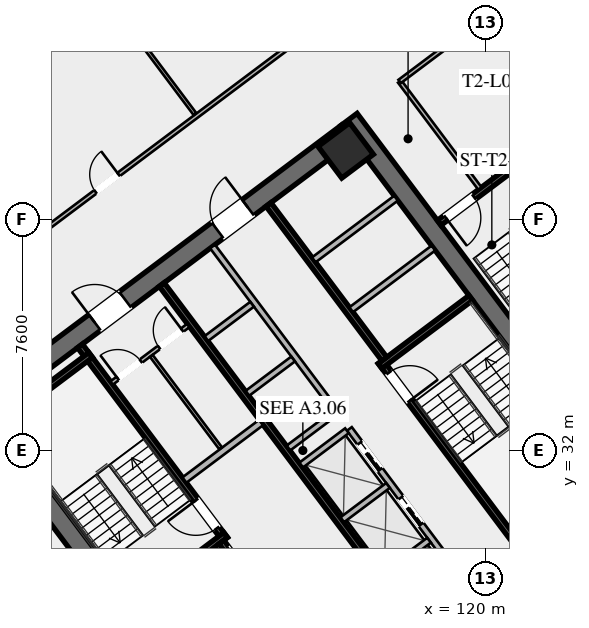
"""IFC4 building model, lengths in metres.
Left out: names, types, materials, properties, quantities, classifications, styles, units other than length and angle.
Written with IfcOpenShell. Run it as: python <this file> out.ifc"""

import sys

from ifc_helpers import new_model, si_unit, direction, frame, frame_2d, origin, origin_2d, place, context, subcontext, project, spatial, rectangle, hollow_rectangle, extrude, element, fill, save


model = new_model("IFC4")
c1 = context("Model", 3, precision=1e-05, world=origin(), true_north=direction((0.0, 1.0)))
c2 = subcontext(c1, "Body", "Model", "MODEL_VIEW")
j1 = project(units=[si_unit("LENGTHUNIT", "METRE"), si_unit("PLANEANGLEUNIT", "RADIAN")], contexts=[c1])
p1 = place(None, origin())
s1 = spatial("IfcSite", under=j1, at=p1, CompositionType="ELEMENT")
p2 = place(p1, origin())
s2 = spatial("IfcBuilding", under=s1, at=p2, CompositionType="ELEMENT")
p3 = place(p2, frame((0.0, 0.0, 24.6)))
s3 = spatial("IfcBuildingStorey", under=s2, at=p3, CompositionType="ELEMENT", Elevation=24.6)
for number, where, z_axis, x_axis in (
    (1, (112.476, 21.107, 0.0), (0.0, 0.0, 1.0), (-0.6, 0.8, 0.0)),
    (2, (115.524, 42.893, 0.0), (0.0, 0.0, 1.0), (0.6, -0.8, 0.0)),
):
    element("IfcWall", number, at=place(p3, frame(where, z_axis=z_axis, x_axis=x_axis)), inside=s3, PredefinedType="SHEAR", context=c2, shape_type="SweptSolid", body=[
        extrude(rectangle(XDim=15.6, YDim=0.65, at=frame_2d((7.8, 0.0))), origin(), (0.0, 0.0, 1.0), 3.55),
    ])
p4 = place(p3, frame((124.429, 30.478, 0.0), z_axis=(0.0, 0.0, 1.0), x_axis=(-0.799998028465, -0.600002628705, 0.0)))
e3 = element("IfcWall", 3, at=p4, inside=s3, PredefinedType="SHEAR", context=c2, shape_type="SweptSolid", body=[
    extrude(rectangle(XDim=14.86, YDim=0.65, at=frame_2d((7.43, 0.0))), origin(), (0.0, 0.0, 1.0), 3.55),
])
p5 = place(p4, frame((9.13, 0.0, 0.0)))
e4 = element("IfcOpeningElement", 4, at=p5, cuts=e3, PredefinedType="OPENING", context=c2, shape_type="SweptSolid", body=[
    extrude(rectangle(XDim=1.25, YDim=2.25, at=frame_2d((0.625, 1.125))), frame((0.0, 0.335, 0.0), z_axis=(0.0, -1.0, 0.0), x_axis=(1.0, 0.0, 0.0)), (0.0, 0.0, 1.0), 0.67),
])
p6 = place(p4, frame((4.08, 0.0, 0.0)))
e5 = element("IfcOpeningElement", 5, at=p6, cuts=e3, PredefinedType="OPENING", context=c2, shape_type="SweptSolid", body=[
    extrude(rectangle(XDim=1.25, YDim=2.25, at=frame_2d((0.625, 1.125))), frame((0.0, 0.335, 0.0), z_axis=(0.0, -1.0, 0.0), x_axis=(1.0, 0.0, 0.0)), (0.0, 0.0, 1.0), 0.67),
])
p7 = place(p3, frame((103.571, 33.522, 0.0), z_axis=(0.0, 0.0, 1.0), x_axis=(0.799998028465, 0.600002628705, 0.0)))
e6 = element("IfcWall", 6, at=p7, inside=s3, PredefinedType="SHEAR", context=c2, shape_type="SweptSolid", body=[
    extrude(rectangle(XDim=14.86, YDim=0.65, at=frame_2d((7.43, 0.0))), origin(), (0.0, 0.0, 1.0), 3.55),
])
p8 = place(p7, frame((4.48, 0.0, 0.0)))
e7 = element("IfcOpeningElement", 7, at=p8, cuts=e6, PredefinedType="OPENING", context=c2, shape_type="SweptSolid", body=[
    extrude(rectangle(XDim=1.25, YDim=2.25, at=frame_2d((0.625, 1.125))), frame((0.0, 0.335, 0.0), z_axis=(0.0, -1.0, 0.0), x_axis=(1.0, 0.0, 0.0)), (0.0, 0.0, 1.0), 0.67),
])
p9 = place(p7, frame((9.53, 0.0, 0.0)))
e8 = element("IfcOpeningElement", 8, at=p9, cuts=e6, PredefinedType="OPENING", context=c2, shape_type="SweptSolid", body=[
    extrude(rectangle(XDim=1.25, YDim=2.25, at=frame_2d((0.625, 1.125))), frame((0.0, 0.335, 0.0), z_axis=(0.0, -1.0, 0.0), x_axis=(1.0, 0.0, 0.0)), (0.0, 0.0, 1.0), 0.67),
])
p10 = place(p3, frame((115.41, 41.87, 0.0), z_axis=(0.0, 0.0, 1.0), x_axis=(0.799999996291, 0.600000004945, 0.0)))
e9 = element("IfcColumn", 9, at=p10, inside=s3, PredefinedType="COLUMN", context=c2, shape_type="SweptSolid", body=[
    extrude(hollow_rectangle(XDim=1.3, YDim=1.3, WallThickness=0.05, at=origin_2d()), origin(), (0.0, 0.0, 1.0), 3.35),
])
p11 = place(p3, frame((111.44, 29.08, 0.0), z_axis=(0.0, 0.0, 1.0), x_axis=(-0.600009827119, 0.799992629566, 0.0)))
e10 = element("IfcWall", 10, at=p11, inside=s3, PredefinedType="SHEAR", context=c2, shape_type="SweptSolid", body=[
    extrude(rectangle(XDim=7.95, YDim=0.2, at=frame_2d((3.975, 0.0))), origin(), (0.0, 0.0, 1.0), 3.35),
])
p12 = place(p11, frame((0.45, 0.0, 0.0)))
e11 = element("IfcOpeningElement", 11, at=p12, cuts=e10, PredefinedType="OPENING", context=c2, shape_type="SweptSolid", body=[
    extrude(rectangle(XDim=1.15, YDim=2.2, at=frame_2d((0.575, 1.1))), frame((0.0, 0.11, 0.0), z_axis=(0.0, -1.0, 0.0), x_axis=(1.0, 0.0, 0.0)), (0.0, 0.0, 1.0), 0.22),
])
for number, where, z_axis, x_axis in (
    (12, (108.476, 26.982, 0.0), (0.0, 0.0, 1.0), (0.8, 0.6, 0.0)),
    (13, (104.036, 32.902, 0.0), (0.0, 0.0, 1.0), (0.8, 0.6, 0.0)),
):
    element("IfcWall", number, at=place(p3, frame(where, z_axis=z_axis, x_axis=x_axis)), inside=s3, PredefinedType="SHEAR", context=c2, shape_type="SweptSolid", body=[
        extrude(rectangle(XDim=3.73, YDim=0.2, at=frame_2d((1.865, 0.0))), origin(), (0.0, 0.0, 1.0), 3.35),
    ])
p13 = place(p3, frame((116.56, 34.92, 0.0), z_axis=(0.0, 0.0, 1.0), x_axis=(0.600009827119, -0.799992629566, 0.0)))
e14 = element("IfcWall", 14, at=p13, inside=s3, PredefinedType="SHEAR", context=c2, shape_type="SweptSolid", body=[
    extrude(rectangle(XDim=7.95, YDim=0.2, at=frame_2d((3.975, 0.0))), origin(), (0.0, 0.0, 1.0), 3.35),
])
p14 = place(p13, frame((0.45, 0.0, 0.0)))
e15 = element("IfcOpeningElement", 15, at=p14, cuts=e14, PredefinedType="OPENING", context=c2, shape_type="SweptSolid", body=[
    extrude(rectangle(XDim=1.15, YDim=2.2, at=frame_2d((0.575, 1.1))), frame((0.0, 0.11, 0.0), z_axis=(0.0, -1.0, 0.0), x_axis=(1.0, 0.0, 0.0)), (0.0, 0.0, 1.0), 0.22),
])
p15 = place(p3, frame((116.54, 34.78, 0.0), z_axis=(0.0, 0.0, 1.0), x_axis=(0.799984290658, 0.600020945218, 0.0)))
e16 = element("IfcWall", 16, at=p15, inside=s3, PredefinedType="SHEAR", context=c2, shape_type="SweptSolid", body=[
    extrude(rectangle(XDim=3.73, YDim=0.2, at=frame_2d((1.865, 0.0))), origin(), (0.0, 0.0, 1.0), 3.35),
])
p16 = place(p3, frame((117.938, 26.016, 0.0), z_axis=(0.0, 0.0, 1.0), x_axis=(-0.600005463273, 0.799995902516, 0.0)))
e17 = element("IfcWall", 17, at=p16, inside=s3, PredefinedType="SHEAR", context=c2, shape_type="SweptSolid", body=[
    extrude(rectangle(XDim=14.3, YDim=0.2, at=frame_2d((7.15, 0.0))), origin(), (0.0, 0.0, 1.0), 3.35),
])
p17 = place(p3, frame((110.104, 31.028, 0.0), z_axis=(0.0, 0.0, 1.0), x_axis=(0.800018601094, 0.59997519774, 0.0)))
e18 = element("IfcWall", 18, at=p17, inside=s3, PredefinedType="SOLIDWALL", context=c2, shape_type="SweptSolid", body=[
    extrude(rectangle(XDim=3.15, YDim=0.22, at=frame_2d((1.575, 0.0))), origin(), (0.0, 0.0, 1.0), 2.703),
])
p18 = place(p3, frame((115.13, 23.91, 0.0), z_axis=(0.0, 0.0, 1.0), x_axis=(-0.599975393228, 0.800018454488, 0.0)))
e19 = element("IfcWall", 19, at=p18, inside=s3, PredefinedType="SHEAR", context=c2, shape_type="SweptSolid", body=[
    extrude(rectangle(XDim=6.35, YDim=0.2, at=frame_2d((3.175, 0.0))), origin(), (0.0, 0.0, 1.0), 3.35),
])
p19 = place(p18, frame((4.775, 0.0, 0.0)))
e20 = element("IfcOpeningElement", 20, at=p19, cuts=e19, PredefinedType="OPENING", context=c2, shape_type="SweptSolid", body=[
    extrude(rectangle(XDim=1.3, YDim=2.25, at=frame_2d((0.65, 1.125))), frame((0.0, 0.11, 0.0), z_axis=(0.0, -1.0, 0.0), x_axis=(1.0, 0.0, 0.0)), (0.0, 0.0, 1.0), 0.22),
])
p20 = place(p18, frame((2.775, 0.0, 0.0)))
e21 = element("IfcOpeningElement", 21, at=p20, cuts=e19, PredefinedType="OPENING", context=c2, shape_type="SweptSolid", body=[
    extrude(rectangle(XDim=1.3, YDim=2.25, at=frame_2d((0.65, 1.125))), frame((0.0, 0.11, 0.0), z_axis=(0.0, -1.0, 0.0), x_axis=(1.0, 0.0, 0.0)), (0.0, 0.0, 1.0), 0.22),
])
p21 = place(p18, frame((0.575, 0.0, 0.0)))
e22 = element("IfcOpeningElement", 22, at=p21, cuts=e19, PredefinedType="OPENING", context=c2, shape_type="SweptSolid", body=[
    extrude(rectangle(XDim=1.3, YDim=2.25, at=frame_2d((0.65, 1.125))), frame((0.0, 0.11, 0.0), z_axis=(0.0, -1.0, 0.0), x_axis=(1.0, 0.0, 0.0)), (0.0, 0.0, 1.0), 0.22),
])
p22 = place(p3, frame((112.87, 40.09, 0.0), z_axis=(0.0, 0.0, 1.0), x_axis=(0.599975393228, -0.800018454488, 0.0)))
e23 = element("IfcWall", 23, at=p22, inside=s3, PredefinedType="SHEAR", context=c2, shape_type="SweptSolid", body=[
    extrude(rectangle(XDim=6.35, YDim=0.2, at=frame_2d((3.175, 0.0))), origin(), (0.0, 0.0, 1.0), 3.35),
])
for number, where, z_axis, x_axis in (
    (24, (115.59, 36.63, 0.0), (0.0, 0.0, 1.0), (0.8, 0.6, 0.0)),
    (25, (114.36, 38.27, 0.0), (0.0, 0.0, 1.0), (0.8, 0.6, 0.0)),
):
    element("IfcWall", number, at=place(p3, frame(where, z_axis=z_axis, x_axis=x_axis)), inside=s3, PredefinedType="SOLIDWALL", context=c2, shape_type="SweptSolid", body=[
        extrude(rectangle(XDim=3.38, YDim=0.2, at=frame_2d((1.69, 0.0))), origin(), (0.0, 0.0, 1.0), 3.35),
    ])
p23 = place(p3, frame((107.71, 34.22, 0.0), z_axis=(0.0, 0.0, 1.0), x_axis=(0.799981399002, 0.60002480053, 0.0)))
e26 = element("IfcWall", 26, at=p23, inside=s3, PredefinedType="PARTITIONING", context=c2, shape_type="SweptSolid", body=[
    extrude(rectangle(XDim=3.15, YDim=0.135, at=frame_2d((1.575, 0.0))), origin(), (0.0, 0.0, 1.0), 2.703),
])
p24 = place(p23, frame((0.25, 0.0, 0.0)))
e27 = element("IfcOpeningElement", 27, at=p24, cuts=e26, PredefinedType="OPENING", context=c2, shape_type="SweptSolid", body=[
    extrude(rectangle(XDim=0.95, YDim=2.05, at=frame_2d((0.475, 1.025))), frame((0.0, 0.077, 0.0), z_axis=(0.0, -1.0, 0.0), x_axis=(1.0, 0.0, 0.0)), (0.0, 0.0, 1.0), 0.155),
])
p25 = place(p23, frame((1.95, 0.0, 0.0)))
e28 = element("IfcOpeningElement", 28, at=p25, cuts=e26, PredefinedType="OPENING", context=c2, shape_type="SweptSolid", body=[
    extrude(rectangle(XDim=0.95, YDim=2.05, at=frame_2d((0.475, 1.025))), frame((0.0, 0.077, 0.0), z_axis=(0.0, -1.0, 0.0), x_axis=(1.0, 0.0, 0.0)), (0.0, 0.0, 1.0), 0.155),
])
p26 = place(p3, frame((111.296, 32.072, 0.0), z_axis=(0.0, 0.0, 1.0), x_axis=(-0.59995887973, 0.800030838552, 0.0)))
e29 = element("IfcWall", 29, at=p26, inside=s3, PredefinedType="PARTITIONING", context=c2, shape_type="SweptSolid", body=[
    extrude(rectangle(XDim=3.8, YDim=0.11, at=frame_2d((1.9, 0.0))), origin(), (0.0, 0.0, 1.0), 2.703),
])
p27 = place(p3, frame((119.61, 27.27, 0.0), z_axis=(0.0, 0.0, 1.0), x_axis=(-0.600011488909, 0.79999138319, 0.0)))
e30 = element("IfcWall", 30, at=p27, inside=s3, PredefinedType="SOLIDWALL", context=c2, shape_type="SweptSolid", body=[
    extrude(rectangle(XDim=6.8, YDim=0.2, at=frame_2d((3.4, 0.0))), origin(), (0.0, 0.0, 1.0), 3.35),
])
p28 = place(p27, frame((0.625, 0.0, 0.0)))
e31 = element("IfcOpeningElement", 31, at=p28, cuts=e30, PredefinedType="OPENING", context=c2, shape_type="SweptSolid", body=[
    extrude(rectangle(XDim=1.1, YDim=2.2, at=frame_2d((0.55, 1.1))), frame((0.0, 0.11, 0.0), z_axis=(0.0, -1.0, 0.0), x_axis=(1.0, 0.0, 0.0)), (0.0, 0.0, 1.0), 0.22),
])
p29 = place(p27, frame((2.875, 0.0, 0.0)))
e32 = element("IfcOpeningElement", 32, at=p29, cuts=e30, PredefinedType="OPENING", context=c2, shape_type="SweptSolid", body=[
    extrude(rectangle(XDim=1.1, YDim=2.2, at=frame_2d((0.55, 1.1))), frame((0.0, 0.11, 0.0), z_axis=(0.0, -1.0, 0.0), x_axis=(1.0, 0.0, 0.0)), (0.0, 0.0, 1.0), 0.22),
])
p30 = place(p27, frame((5.125, 0.0, 0.0)))
e33 = element("IfcOpeningElement", 33, at=p30, cuts=e30, PredefinedType="OPENING", context=c2, shape_type="SweptSolid", body=[
    extrude(rectangle(XDim=1.1, YDim=2.2, at=frame_2d((0.55, 1.1))), frame((0.0, 0.11, 0.0), z_axis=(0.0, -1.0, 0.0), x_axis=(1.0, 0.0, 0.0)), (0.0, 0.0, 1.0), 0.22),
])
p31 = place(p3, frame((116.646, 27.922, 0.0), z_axis=(0.0, 0.0, 1.0), x_axis=(0.8, 0.6, 0.0)))
e34 = element("IfcWall", 34, at=p31, inside=s3, PredefinedType="SOLIDWALL", context=c2, shape_type="SweptSolid", body=[
    extrude(rectangle(XDim=1.88, YDim=0.2, at=frame_2d((0.94, 0.0))), origin(), (0.0, 0.0, 1.0), 3.35),
])
p32 = place(p3, frame((115.296, 29.722, 0.0), z_axis=(0.0, 0.0, 1.0), x_axis=(0.799984418148, 0.600020775241, 0.0)))
e35 = element("IfcWall", 35, at=p32, inside=s3, PredefinedType="SOLIDWALL", context=c2, shape_type="SweptSolid", body=[
    extrude(rectangle(XDim=1.88, YDim=0.2, at=frame_2d((0.94, 0.0))), origin(), (0.0, 0.0, 1.0), 3.35),
])
p33 = place(p3, frame((113.946, 31.522, 0.0), z_axis=(0.0, 0.0, 1.0), x_axis=(0.8, 0.6, 0.0)))
e36 = element("IfcWall", 36, at=p33, inside=s3, PredefinedType="SOLIDWALL", context=c2, shape_type="SweptSolid", body=[
    extrude(rectangle(XDim=1.88, YDim=0.2, at=frame_2d((0.94, 0.0))), origin(), (0.0, 0.0, 1.0), 3.35),
])
p34 = place(p3, frame((115.11, 33.27, 0.0), z_axis=(0.0, 0.0, 1.0), x_axis=(-0.600011488909, 0.79999138319, 0.0)))
e37 = element("IfcWall", 37, at=p34, inside=s3, PredefinedType="SOLIDWALL", context=c2, shape_type="SweptSolid", body=[
    extrude(rectangle(XDim=6.8, YDim=0.2, at=frame_2d((3.4, 0.0))), origin(), (0.0, 0.0, 1.0), 3.35),
])
p35 = place(p3, frame((113.526, 32.082, 0.0), z_axis=(0.0, 0.0, 1.0), x_axis=(0.800046745961, 0.599937666993, 0.0)))
e38 = element("IfcWall", 38, at=p35, inside=s3, PredefinedType="SOLIDWALL", context=c2, shape_type="SweptSolid", body=[
    extrude(rectangle(XDim=1.88, YDim=0.2, at=frame_2d((0.94, 0.0))), origin(), (0.0, 0.0, 1.0), 3.35),
])
p36 = place(p3, frame((112.176, 33.882, 0.0), z_axis=(0.0, 0.0, 1.0), x_axis=(0.8, 0.6, 0.0)))
e39 = element("IfcWall", 39, at=p36, inside=s3, PredefinedType="SOLIDWALL", context=c2, shape_type="SweptSolid", body=[
    extrude(rectangle(XDim=1.88, YDim=0.2, at=frame_2d((0.94, 0.0))), origin(), (0.0, 0.0, 1.0), 3.35),
])
p37 = place(p3, frame((110.826, 35.682, 0.0), z_axis=(0.0, 0.0, 1.0), x_axis=(0.799984418148, 0.600020775241, 0.0)))
e40 = element("IfcWall", 40, at=p37, inside=s3, PredefinedType="SOLIDWALL", context=c2, shape_type="SweptSolid", body=[
    extrude(rectangle(XDim=1.88, YDim=0.2, at=frame_2d((0.94, 0.0))), origin(), (0.0, 0.0, 1.0), 3.35),
])
p38 = place(p3, frame((121.204, 41.528, 0.0), z_axis=(0.0, 0.0, 1.0), x_axis=(-0.800017232136, -0.599977023131, 0.0)))
e41 = element("IfcWall", 41, at=p38, inside=s3, PredefinedType="SHEAR", context=c2, shape_type="SweptSolid", body=[
    extrude(rectangle(XDim=3.4, YDim=0.2, at=frame_2d((1.7, 0.0))), origin(), (0.0, 0.0, 1.0), 3.35),
])
p39 = place(p38, frame((1.975, 0.0, 0.0)))
e42 = element("IfcOpeningElement", 42, at=p39, cuts=e41, PredefinedType="OPENING", context=c2, shape_type="SweptSolid", body=[
    extrude(rectangle(XDim=1.15, YDim=2.2, at=frame_2d((0.575, 1.1))), frame((0.0, 0.11, 0.0), z_axis=(0.0, -1.0, 0.0), x_axis=(1.0, 0.0, 0.0)), (0.0, 0.0, 1.0), 0.22),
])
p40 = place(p3, frame((119.824, 40.618, 0.0), z_axis=(0.0, 0.0, 1.0), x_axis=(-0.599982243973, 0.800013316712, 0.0)))
e43 = element("IfcWall", 43, at=p40, inside=s3, PredefinedType="PARTITIONING", context=c2, shape_type="SweptSolid", body=[
    extrude(rectangle(XDim=4.4, YDim=0.135, at=frame_2d((2.2, 0.0))), origin(), (0.0, 0.0, 1.0), 2.703),
])
p41 = place(p3, frame((98.516, 34.012, 0.0), z_axis=(0.0, 0.0, 1.0), x_axis=(0.799998035726, 0.600002619023, 0.0)))
e44 = element("IfcWall", 44, at=p41, inside=s3, PredefinedType="PARTITIONING", context=c2, shape_type="SweptSolid", body=[
    extrude(rectangle(XDim=29.83, YDim=0.135, at=frame_2d((14.915, 0.0))), origin(), (0.0, 0.0, 1.0), 2.703),
])
p42 = place(p41, frame((0.3, 0.0, 0.0)))
e45 = element("IfcOpeningElement", 45, at=p42, cuts=e44, PredefinedType="OPENING", context=c2, shape_type="SweptSolid", body=[
    extrude(rectangle(XDim=0.95, YDim=2.05, at=frame_2d((0.475, 1.025))), frame((0.0, 0.077, 0.0), z_axis=(0.0, -1.0, 0.0), x_axis=(1.0, 0.0, 0.0)), (0.0, 0.0, 1.0), 0.155),
])
p43 = place(p41, frame((10.829, 0.0, 0.0)))
e46 = element("IfcOpeningElement", 46, at=p43, cuts=e44, PredefinedType="OPENING", context=c2, shape_type="SweptSolid", body=[
    extrude(rectangle(XDim=0.95, YDim=2.05, at=frame_2d((0.475, 1.025))), frame((0.0, 0.077, 0.0), z_axis=(0.0, -1.0, 0.0), x_axis=(1.0, 0.0, 0.0)), (0.0, 0.0, 1.0), 0.155),
])
p44 = place(p41, frame((28.58, 0.0, 0.0)))
e47 = element("IfcOpeningElement", 47, at=p44, cuts=e44, PredefinedType="OPENING", context=c2, shape_type="SweptSolid", body=[
    extrude(rectangle(XDim=0.95, YDim=2.05, at=frame_2d((0.475, 1.025))), frame((0.0, 0.077, 0.0), z_axis=(0.0, -1.0, 0.0), x_axis=(1.0, 0.0, 0.0)), (0.0, 0.0, 1.0), 0.155),
])
p45 = place(p3, frame((110.452, 43.064, 0.0), z_axis=(0.0, 0.0, 1.0), x_axis=(-0.599992698573, 0.800005476018, 0.0)))
e48 = element("IfcWall", 48, at=p45, inside=s3, PredefinedType="PARTITIONING", context=c2, shape_type="SweptSolid", body=[
    extrude(rectangle(XDim=10.7, YDim=0.11, at=frame_2d((5.35, 0.0))), origin(), (0.0, 0.0, 1.0), 2.703),
])
p46 = place(p3, frame((135.46, 34.47, 0.0), z_axis=(0.0, 0.0, 1.0), x_axis=(-0.800000982127, -0.599998690494, 0.0)))
e49 = element("IfcWall", 49, at=p46, inside=s3, PredefinedType="PARTITIONING", context=c2, shape_type="SweptSolid", body=[
    extrude(rectangle(XDim=29.83, YDim=0.135, at=frame_2d((14.915, 0.0))), origin(), (0.0, 0.0, 1.0), 2.703),
])
p47 = place(p46, frame((28.5, 0.0, 0.0)))
e50 = element("IfcOpeningElement", 50, at=p47, cuts=e49, PredefinedType="OPENING", context=c2, shape_type="SweptSolid", body=[
    extrude(rectangle(XDim=0.95, YDim=2.05, at=frame_2d((0.475, 1.025))), frame((0.0, 0.077, 0.0), z_axis=(0.0, -1.0, 0.0), x_axis=(1.0, 0.0, 0.0)), (0.0, 0.0, 1.0), 0.155),
])
p48 = place(p46, frame((18.075, 0.0, 0.0)))
e51 = element("IfcOpeningElement", 51, at=p48, cuts=e49, PredefinedType="OPENING", context=c2, shape_type="SweptSolid", body=[
    extrude(rectangle(XDim=0.95, YDim=2.05, at=frame_2d((0.475, 1.025))), frame((0.0, 0.077, 0.0), z_axis=(0.0, -1.0, 0.0), x_axis=(1.0, 0.0, 0.0)), (0.0, 0.0, 1.0), 0.155),
])
p49 = place(p46, frame((0.38, 0.0, 0.0)))
e52 = element("IfcOpeningElement", 52, at=p49, cuts=e49, PredefinedType="OPENING", context=c2, shape_type="SweptSolid", body=[
    extrude(rectangle(XDim=0.95, YDim=2.05, at=frame_2d((0.475, 1.025))), frame((0.0, 0.077, 0.0), z_axis=(0.0, -1.0, 0.0), x_axis=(1.0, 0.0, 0.0)), (0.0, 0.0, 1.0), 0.155),
])
p50 = place(p3, frame((126.664, 51.248, 0.0), z_axis=(0.0, 0.0, 1.0), x_axis=(-0.799995055373, -0.600006592779, 0.0)))
e53 = element("IfcWall", 53, at=p50, inside=s3, PredefinedType="PARTITIONING", context=c2, shape_type="SweptSolid", body=[
    extrude(rectangle(XDim=11.85, YDim=0.135, at=frame_2d((5.925, 0.0))), origin(), (0.0, 0.0, 1.0), 2.703),
])
p51 = place(p50, frame((5.8, 0.0, 0.0)))
e54 = element("IfcOpeningElement", 54, at=p51, cuts=e53, PredefinedType="OPENING", context=c2, shape_type="SweptSolid", body=[
    extrude(rectangle(XDim=0.95, YDim=2.05, at=frame_2d((0.475, 1.025))), frame((0.0, 0.077, 0.0), z_axis=(0.0, -1.0, 0.0), x_axis=(1.0, 0.0, 0.0)), (0.0, 0.0, 1.0), 0.155),
])
p52 = place(p3, frame((111.548, 16.636, 0.0), z_axis=(0.0, 0.0, 1.0), x_axis=(-0.600003610192, 0.799997292343, 0.0)))
e55 = element("IfcWall", 55, at=p52, inside=s3, PredefinedType="PARTITIONING", context=c2, shape_type="SweptSolid", body=[
    extrude(rectangle(XDim=21.64, YDim=0.135, at=frame_2d((10.82, 0.0))), origin(), (0.0, 0.0, 1.0), 2.703),
])
p53 = place(p52, frame((0.3, 0.0, 0.0)))
e56 = element("IfcOpeningElement", 56, at=p53, cuts=e55, PredefinedType="OPENING", context=c2, shape_type="SweptSolid", body=[
    extrude(rectangle(XDim=0.95, YDim=2.05, at=frame_2d((0.475, 1.025))), frame((0.0, 0.077, 0.0), z_axis=(0.0, -1.0, 0.0), x_axis=(1.0, 0.0, 0.0)), (0.0, 0.0, 1.0), 0.155),
])
p54 = place(p8, origin())
e57 = element("IfcDoor", 57, at=p54, inside=s3, OperationType="SINGLE_SWING_LEFT", PredefinedType="DOOR", context=c2, shape_type="SweptSolid", body=[
    extrude(rectangle(XDim=1.25, YDim=2.25, at=frame_2d((0.625, 1.125))), frame((0.0, 0.025, 0.0), z_axis=(0.0, -1.0, 0.0), x_axis=(1.0, 0.0, 0.0)), (0.0, 0.0, 1.0), 0.05),
])
fill(e7, e57)
p55 = place(p9, origin())
e58 = element("IfcDoor", 58, at=p55, inside=s3, OperationType="SINGLE_SWING_RIGHT", PredefinedType="DOOR", context=c2, shape_type="SweptSolid", body=[
    extrude(rectangle(XDim=1.25, YDim=2.25, at=frame_2d((0.625, 1.125))), frame((0.0, 0.025, 0.0), z_axis=(0.0, -1.0, 0.0), x_axis=(1.0, 0.0, 0.0)), (0.0, 0.0, 1.0), 0.05),
])
fill(e8, e58)
p56 = place(p12, origin())
e59 = element("IfcDoor", 59, at=p56, inside=s3, OperationType="SINGLE_SWING_RIGHT", PredefinedType="DOOR", context=c2, shape_type="SweptSolid", body=[
    extrude(rectangle(XDim=1.15, YDim=2.2, at=frame_2d((0.575, 1.1))), frame((0.0, 0.025, 0.0), z_axis=(0.0, -1.0, 0.0), x_axis=(1.0, 0.0, 0.0)), (0.0, 0.0, 1.0), 0.05),
])
fill(e11, e59)
p57 = place(p14, origin())
e60 = element("IfcDoor", 60, at=p57, inside=s3, OperationType="SINGLE_SWING_RIGHT", PredefinedType="DOOR", context=c2, shape_type="SweptSolid", body=[
    extrude(rectangle(XDim=1.15, YDim=2.2, at=frame_2d((0.575, 1.1))), frame((0.0, 0.025, 0.0), z_axis=(0.0, -1.0, 0.0), x_axis=(1.0, 0.0, 0.0)), (0.0, 0.0, 1.0), 0.05),
])
fill(e15, e60)
p58 = place(p24, origin())
e61 = element("IfcDoor", 61, at=p58, inside=s3, OperationType="SINGLE_SWING_LEFT", PredefinedType="DOOR", context=c2, shape_type="SweptSolid", body=[
    extrude(rectangle(XDim=0.95, YDim=2.05, at=frame_2d((0.475, 1.025))), frame((0.0, 0.025, 0.0), z_axis=(0.0, -1.0, 0.0), x_axis=(1.0, 0.0, 0.0)), (0.0, 0.0, 1.0), 0.05),
])
fill(e27, e61)
p59 = place(p25, origin())
e62 = element("IfcDoor", 62, at=p59, inside=s3, OperationType="SINGLE_SWING_RIGHT", PredefinedType="DOOR", context=c2, shape_type="SweptSolid", body=[
    extrude(rectangle(XDim=0.95, YDim=2.05, at=frame_2d((0.475, 1.025))), frame((0.0, 0.025, 0.0), z_axis=(0.0, -1.0, 0.0), x_axis=(1.0, 0.0, 0.0)), (0.0, 0.0, 1.0), 0.05),
])
fill(e28, e62)
p60 = place(p39, origin())
e63 = element("IfcDoor", 63, at=p60, inside=s3, OperationType="SINGLE_SWING_RIGHT", PredefinedType="DOOR", context=c2, shape_type="SweptSolid", body=[
    extrude(rectangle(XDim=1.15, YDim=2.2, at=frame_2d((0.575, 1.1))), frame((0.0, 0.025, 0.0), z_axis=(0.0, -1.0, 0.0), x_axis=(1.0, 0.0, 0.0)), (0.0, 0.0, 1.0), 0.05),
])
fill(e42, e63)
p61 = place(p43, origin())
e64 = element("IfcDoor", 64, at=p61, inside=s3, OperationType="SINGLE_SWING_RIGHT", PredefinedType="DOOR", context=c2, shape_type="SweptSolid", body=[
    extrude(rectangle(XDim=0.95, YDim=2.05, at=frame_2d((0.475, 1.025))), frame((0.0, 0.025, 0.0), z_axis=(0.0, -1.0, 0.0), x_axis=(1.0, 0.0, 0.0)), (0.0, 0.0, 1.0), 0.05),
])
fill(e46, e64)
p62 = place(p29, origin())
e65 = element("IfcDoor", 65, at=p62, inside=s3, OperationType="SLIDING_TO_LEFT", PredefinedType="DOOR", context=c2, shape_type="SweptSolid", body=[
    extrude(rectangle(XDim=1.1, YDim=2.2, at=frame_2d((0.55, 1.1))), frame((0.0, 0.025, 0.0), z_axis=(0.0, -1.0, 0.0), x_axis=(1.0, 0.0, 0.0)), (0.0, 0.0, 1.0), 0.05),
])
fill(e32, e65)
p63 = place(p30, origin())
e66 = element("IfcDoor", 66, at=p63, inside=s3, OperationType="SLIDING_TO_LEFT", PredefinedType="DOOR", context=c2, shape_type="SweptSolid", body=[
    extrude(rectangle(XDim=1.1, YDim=2.2, at=frame_2d((0.55, 1.1))), frame((0.0, 0.025, 0.0), z_axis=(0.0, -1.0, 0.0), x_axis=(1.0, 0.0, 0.0)), (0.0, 0.0, 1.0), 0.05),
])
fill(e33, e66)
save(model, sys.argv[1])
